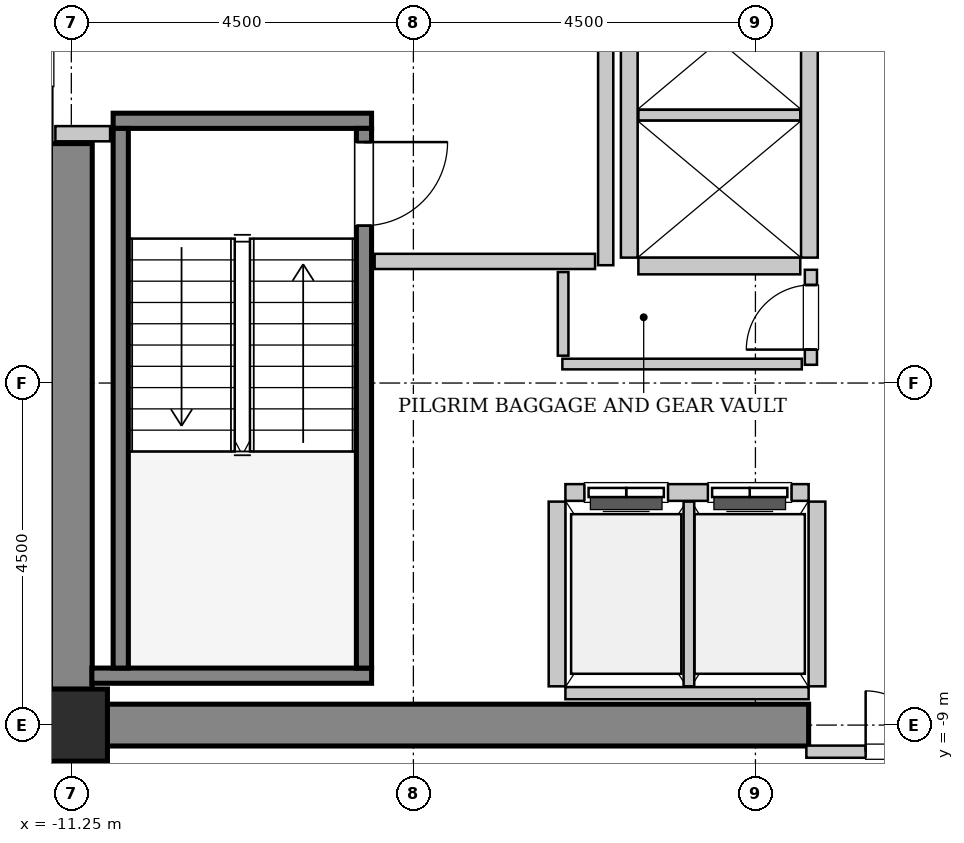
"""IFC4 building model, lengths in metres.
Left out: names, types, materials, properties, quantities, classifications, styles, units other than length and angle.
Written with IfcOpenShell. Run it as: python <this file> out.ifc"""

import sys

from ifc_helpers import new_model, si_unit, direction, frame, frame_2d, origin, origin_2d, place, context, subcontext, project, spatial, rectangle, hollow_rectangle, extrude, source, transform, mapped, element, fill, save


model = new_model("IFC4")
c1 = context("Model", 3, precision=1e-05, world=origin(), true_north=direction((0.0, 1.0)))
c2 = subcontext(c1, "Body", "Model", "MODEL_VIEW")
j1 = project(units=[si_unit("LENGTHUNIT", "METRE"), si_unit("PLANEANGLEUNIT", "RADIAN")], contexts=[c1])
p1 = place(None, origin())
s1 = spatial("IfcSite", under=j1, at=p1, CompositionType="ELEMENT")
p2 = place(p1, origin())
s2 = spatial("IfcBuilding", under=s1, at=p2, CompositionType="ELEMENT")
p3 = place(p2, frame((0.0, 0.0, 160.2)))
s3 = spatial("IfcBuildingStorey", under=s2, at=p3, CompositionType="ELEMENT", Elevation=160.2)
m1 = source(origin(), c2, "Body", "SweptSolid", [
    extrude(rectangle(XDim=9.975, YDim=0.55, at=frame_2d((4.987, 0.0))), origin(), (0.0, 0.0, 1.0), 3.8),
])
p4 = place(p3, frame((-11.525, -9.0, 0.0), z_axis=(0.0, 0.0, 1.0), x_axis=(1.0, 0.0, 0.0)))
e1 = element("IfcWall", 1, at=p4, inside=s3, PredefinedType="SHEAR", context=c2, shape_type="MappedRepresentation", body=[
    mapped(m1, transform((0.0, 0.0, 0.0), x_axis=(1.0, 0.0, 0.0), y_axis=(0.0, 1.0, 0.0), z_axis=(0.0, 0.0, 1.0), scale=1.0)),
])
m2 = source(origin(), c2, "Body", "SweptSolid", [
    extrude(rectangle(XDim=7.375, YDim=0.55, at=frame_2d((3.688, 0.0))), origin(), (0.0, 0.0, 1.0), 3.8),
])
p5 = place(p3, frame((-11.25, -8.725, 0.0), z_axis=(0.0, 0.0, 1.0), x_axis=(0.0, 1.0, 0.0)))
e2 = element("IfcWall", 2, at=p5, inside=s3, PredefinedType="SHEAR", context=c2, shape_type="MappedRepresentation", body=[
    mapped(m2, transform((0.0, 0.0, 0.0), x_axis=(1.0, 0.0, 0.0), y_axis=(0.0, 1.0, 0.0), z_axis=(0.0, 0.0, 1.0), scale=1.0)),
])
m3 = source(origin(), c2, "Body", "SweptSolid", [
    extrude(hollow_rectangle(XDim=0.95, YDim=0.95, WallThickness=0.045, InnerFilletRadius=0.045, OuterFilletRadius=0.09, at=origin_2d()), origin(), (0.0, 0.0, 1.0), 3.8),
])
p6 = place(p3, frame((-11.25, -9.0, 0.0), z_axis=(0.0, 0.0, 1.0), x_axis=(1.0, 0.0, 0.0)))
e3 = element("IfcColumn", 3, at=p6, inside=s3, PredefinedType="COLUMN", context=c2, shape_type="MappedRepresentation", body=[
    mapped(m3, transform((0.0, 0.0, 0.0), x_axis=(1.0, 0.0, 0.0), y_axis=(0.0, 1.0, 0.0), z_axis=(0.0, 0.0, 1.0), scale=1.0)),
])
m4 = source(origin(), c2, "Body", "SweptSolid", [
    extrude(rectangle(XDim=3.4, YDim=0.2, at=frame_2d((1.7, 0.0))), origin(), (0.0, 0.0, 1.0), 3.8),
])
p7 = place(p3, frame((-10.7, -1.05, 0.0), z_axis=(0.0, 0.0, 1.0), x_axis=(1.0, 0.0, 0.0)))
e4 = element("IfcWall", 4, at=p7, inside=s3, PredefinedType="SOLIDWALL", context=c2, shape_type="MappedRepresentation", body=[
    mapped(m4, transform((0.0, 0.0, 0.0), x_axis=(1.0, 0.0, 0.0), y_axis=(0.0, 1.0, 0.0), z_axis=(0.0, 0.0, 1.0), scale=1.0)),
])
m5 = source(origin(), c2, "Body", "SweptSolid", [
    extrude(rectangle(XDim=3.68, YDim=0.2, at=frame_2d((1.84, 0.0))), origin(), (0.0, 0.0, 1.0), 3.8),
])
p8 = place(p3, frame((-10.98, -8.35, 0.0), z_axis=(0.0, 0.0, 1.0), x_axis=(1.0, 0.0, 0.0)))
e5 = element("IfcWall", 5, at=p8, inside=s3, PredefinedType="SOLIDWALL", context=c2, shape_type="MappedRepresentation", body=[
    mapped(m5, transform((0.0, 0.0, 0.0), x_axis=(1.0, 0.0, 0.0), y_axis=(0.0, 1.0, 0.0), z_axis=(0.0, 0.0, 1.0), scale=1.0)),
])
m6 = source(origin(), c2, "Body", "SweptSolid", [
    extrude(rectangle(XDim=7.1, YDim=0.2, at=frame_2d((3.55, 0.0))), origin(), (0.0, 0.0, 1.0), 3.8),
])
p9 = place(p3, frame((-10.6, -1.15, 0.0), z_axis=(0.0, 0.0, 1.0), x_axis=(0.0, -1.0, 0.0)))
e6 = element("IfcWall", 6, at=p9, inside=s3, PredefinedType="SOLIDWALL", context=c2, shape_type="MappedRepresentation", body=[
    mapped(m6, transform((0.0, 0.0, 0.0), x_axis=(1.0, 0.0, 0.0), y_axis=(0.0, 1.0, 0.0), z_axis=(0.0, 0.0, 1.0), scale=1.0)),
])
p10 = place(p3, frame((-7.4, -1.15, 0.0), z_axis=(0.0, 0.0, 1.0), x_axis=(0.0, -1.0, 0.0)))
e7 = element("IfcWall", 7, at=p10, inside=s3, PredefinedType="SOLIDWALL", context=c2, shape_type="MappedRepresentation", body=[
    mapped(m6, transform((0.0, 0.0, 0.0), x_axis=(1.0, 0.0, 0.0), y_axis=(0.0, 1.0, 0.0), z_axis=(0.0, 0.0, 1.0), scale=1.0)),
])
p11 = place(p10, frame((0.18, 0.0, 0.0)))
e8 = element("IfcOpeningElement", 8, at=p11, cuts=e7, PredefinedType="OPENING", context=c2, shape_type="SweptSolid", body=[
    extrude(rectangle(XDim=1.1, YDim=2.15, at=frame_2d((0.55, 1.075))), frame((0.0, 0.11, 0.0), z_axis=(0.0, -1.0, 0.0), x_axis=(1.0, 0.0, 0.0)), (0.0, 0.0, 1.0), 0.22),
])
m7 = source(origin(), c2, "Body", "SweptSolid", [
    extrude(rectangle(XDim=3.2, YDim=0.22, at=frame_2d((1.6, 0.0))), origin(), (0.0, 0.0, 1.0), 3.535),
])
p12 = place(p3, frame((-1.55, -5.94, 0.0), z_axis=(0.0, 0.0, 1.0), x_axis=(-1.0, 0.0, 0.0)))
e9 = element("IfcWall", 9, at=p12, inside=s3, PredefinedType="SOLIDWALL", context=c2, shape_type="MappedRepresentation", body=[
    mapped(m7, transform((0.0, 0.0, 0.0), x_axis=(1.0, 0.0, 0.0), y_axis=(0.0, 1.0, 0.0), z_axis=(0.0, 0.0, 1.0), scale=1.0)),
])
p13 = place(p12, frame((1.85, 0.0, 0.0)))
e10 = element("IfcOpeningElement", 10, at=p13, cuts=e9, PredefinedType="OPENING", context=c2, shape_type="SweptSolid", body=[
    extrude(rectangle(XDim=1.1, YDim=2.2, at=frame_2d((0.55, 1.1))), frame((0.0, 0.12, 0.0), z_axis=(0.0, -1.0, 0.0), x_axis=(1.0, 0.0, 0.0)), (0.0, 0.0, 1.0), 0.24),
])
p14 = place(p12, frame((0.225, 0.0, 0.0)))
e11 = element("IfcOpeningElement", 11, at=p14, cuts=e9, PredefinedType="OPENING", context=c2, shape_type="SweptSolid", body=[
    extrude(rectangle(XDim=1.1, YDim=2.2, at=frame_2d((0.55, 1.1))), frame((0.0, 0.12, 0.0), z_axis=(0.0, -1.0, 0.0), x_axis=(1.0, 0.0, 0.0)), (0.0, 0.0, 1.0), 0.24),
])
m8 = source(origin(), c2, "Body", "SweptSolid", [
    extrude(rectangle(XDim=3.2, YDim=0.16, at=frame_2d((1.6, 0.0))), origin(), (0.0, 0.0, 1.0), 2.425),
])
p15 = place(p3, frame((-4.75, -8.58, 0.0), z_axis=(0.0, 0.0, 1.0), x_axis=(1.0, 0.0, 0.0)))
e12 = element("IfcWall", 12, at=p15, inside=s3, PredefinedType="PARTITIONING", context=c2, shape_type="MappedRepresentation", body=[
    mapped(m8, transform((0.0, 0.0, 0.0), x_axis=(1.0, 0.0, 0.0), y_axis=(0.0, 1.0, 0.0), z_axis=(0.0, 0.0, 1.0), scale=1.0)),
])
m9 = source(origin(), c2, "Body", "SweptSolid", [
    extrude(rectangle(XDim=2.43, YDim=0.22, at=frame_2d((1.215, 0.0))), origin(), (0.0, 0.0, 1.0), 3.535),
])
p16 = place(p3, frame((-4.86, -6.06, 0.0), z_axis=(0.0, 0.0, 1.0), x_axis=(0.0, -1.0, 0.0)))
e13 = element("IfcWall", 13, at=p16, inside=s3, PredefinedType="SOLIDWALL", context=c2, shape_type="MappedRepresentation", body=[
    mapped(m9, transform((0.0, 0.0, 0.0), x_axis=(1.0, 0.0, 0.0), y_axis=(0.0, 1.0, 0.0), z_axis=(0.0, 0.0, 1.0), scale=1.0)),
])
m10 = source(origin(), c2, "Body", "SweptSolid", [
    extrude(rectangle(XDim=2.43, YDim=0.14, at=frame_2d((1.215, 0.0))), origin(), (0.0, 0.0, 1.0), 3.535),
])
p17 = place(p3, frame((-3.125, -8.49, 0.0), z_axis=(0.0, 0.0, 1.0), x_axis=(0.0, 1.0, 0.0)))
e14 = element("IfcWall", 14, at=p17, inside=s3, PredefinedType="PARTITIONING", context=c2, shape_type="MappedRepresentation", body=[
    mapped(m10, transform((0.0, 0.0, 0.0), x_axis=(1.0, 0.0, 0.0), y_axis=(0.0, 1.0, 0.0), z_axis=(0.0, 0.0, 1.0), scale=1.0)),
])
p18 = place(p3, frame((-1.44, -8.49, 0.0), z_axis=(0.0, 0.0, 1.0), x_axis=(0.0, 1.0, 0.0)))
e15 = element("IfcWall", 15, at=p18, inside=s3, PredefinedType="SOLIDWALL", context=c2, shape_type="MappedRepresentation", body=[
    mapped(m9, transform((0.0, 0.0, 0.0), x_axis=(1.0, 0.0, 0.0), y_axis=(0.0, 1.0, 0.0), z_axis=(0.0, 0.0, 1.0), scale=1.0)),
])
m11 = source(origin(), c2, "Body", "SweptSolid", [
    extrude(rectangle(XDim=5.7, YDim=0.22, at=frame_2d((2.85, 0.0))), origin(), (0.0, 0.0, 1.0), 3.535),
])
for number, where, z_axis, x_axis in (
    (16, (-1.54, -2.85, 0.0), (0.0, 0.0, 1.0), (0.0, 1.0, 0.0)),
    (17, (-3.91, 2.85, 0.0), (0.0, 0.0, 1.0), (0.0, -1.0, 0.0)),
):
    element("IfcWall", number, at=place(p3, frame(where, z_axis=z_axis, x_axis=x_axis)), inside=s3, PredefinedType="SOLIDWALL", context=c2, shape_type="MappedRepresentation", body=[
        mapped(m11, transform((0.0, 0.0, 0.0), x_axis=(1.0, 0.0, 0.0), y_axis=(0.0, 1.0, 0.0), z_axis=(0.0, 0.0, 1.0), scale=1.0)),
    ])
m12 = source(origin(), c2, "Body", "SweptSolid", [
    extrude(rectangle(XDim=2.13, YDim=0.22, at=frame_2d((1.065, 0.0))), origin(), (0.0, 0.0, 1.0), 3.535),
])
p19 = place(p3, frame((-3.79, -2.96, 0.0), z_axis=(0.0, 0.0, 1.0), x_axis=(1.0, 0.0, 0.0)))
e18 = element("IfcWall", 18, at=p19, inside=s3, PredefinedType="SOLIDWALL", context=c2, shape_type="MappedRepresentation", body=[
    mapped(m12, transform((0.0, 0.0, 0.0), x_axis=(1.0, 0.0, 0.0), y_axis=(0.0, 1.0, 0.0), z_axis=(0.0, 0.0, 1.0), scale=1.0)),
])
m13 = source(origin(), c2, "Body", "SweptSolid", [
    extrude(rectangle(XDim=2.13, YDim=0.14, at=frame_2d((1.065, 0.0))), origin(), (0.0, 0.0, 1.0), 3.535),
])
p20 = place(p3, frame((-3.79, -0.975, 0.0), z_axis=(0.0, 0.0, 1.0), x_axis=(1.0, 0.0, 0.0)))
e19 = element("IfcWall", 19, at=p20, inside=s3, PredefinedType="PARTITIONING", context=c2, shape_type="MappedRepresentation", body=[
    mapped(m13, transform((0.0, 0.0, 0.0), x_axis=(1.0, 0.0, 0.0), y_axis=(0.0, 1.0, 0.0), z_axis=(0.0, 0.0, 1.0), scale=1.0)),
])
m14 = source(origin(), c2, "Body", "SweptSolid", [
    extrude(rectangle(XDim=5.9, YDim=0.2, at=frame_2d((2.95, 0.0))), origin(), (0.0, 0.0, 1.0), 3.535),
])
p21 = place(p3, frame((-4.22, -2.95, 0.0), z_axis=(0.0, 0.0, 1.0), x_axis=(0.0, 1.0, 0.0)))
e20 = element("IfcWall", 20, at=p21, inside=s3, PredefinedType="PARTITIONING", context=c2, shape_type="MappedRepresentation", body=[
    mapped(m14, transform((0.0, 0.0, 0.0), x_axis=(1.0, 0.0, 0.0), y_axis=(0.0, 1.0, 0.0), z_axis=(0.0, 0.0, 1.0), scale=1.0)),
])
m15 = source(origin(), c2, "Body", "SweptSolid", [
    extrude(rectangle(XDim=2.9, YDim=0.2, at=frame_2d((1.45, 0.0))), origin(), (0.0, 0.0, 1.0), 3.535),
])
p22 = place(p3, frame((-7.26, -2.9, 0.0), z_axis=(0.0, 0.0, 1.0), x_axis=(1.0, 0.0, 0.0)))
e21 = element("IfcWall", 21, at=p22, inside=s3, PredefinedType="PARTITIONING", context=c2, shape_type="MappedRepresentation", body=[
    mapped(m15, transform((0.0, 0.0, 0.0), x_axis=(1.0, 0.0, 0.0), y_axis=(0.0, 1.0, 0.0), z_axis=(0.0, 0.0, 1.0), scale=1.0)),
])
m16 = source(origin(), c2, "Body", "SweptSolid", [
    extrude(rectangle(XDim=0.72, YDim=0.2, at=frame_2d((0.36, 0.0))), origin(), (0.0, 0.0, 1.0), 3.535),
])
p23 = place(p3, frame((-11.46, -1.22, 0.0), z_axis=(0.0, 0.0, 1.0), x_axis=(1.0, 0.0, 0.0)))
e22 = element("IfcWall", 22, at=p23, inside=s3, PredefinedType="PARTITIONING", context=c2, shape_type="MappedRepresentation", body=[
    mapped(m16, transform((0.0, 0.0, 0.0), x_axis=(1.0, 0.0, 0.0), y_axis=(0.0, 1.0, 0.0), z_axis=(0.0, 0.0, 1.0), scale=1.0)),
])
m17 = source(origin(), c2, "Body", "SweptSolid", [
    extrude(rectangle(XDim=3.16, YDim=0.16, at=frame_2d((1.58, 0.0))), origin(), (0.0, 0.0, 1.0), 2.425),
])
p24 = place(p3, frame((-1.58, -9.35, 0.0), z_axis=(0.0, 0.0, 1.0), x_axis=(1.0, 0.0, 0.0)))
e23 = element("IfcWall", 23, at=p24, inside=s3, PredefinedType="PARTITIONING", context=c2, shape_type="MappedRepresentation", body=[
    mapped(m17, transform((0.0, 0.0, 0.0), x_axis=(1.0, 0.0, 0.0), y_axis=(0.0, 1.0, 0.0), z_axis=(0.0, 0.0, 1.0), scale=1.0)),
])
p25 = place(p24, frame((0.78, 0.0, 0.0)))
e24 = element("IfcOpeningElement", 24, at=p25, cuts=e23, PredefinedType="OPENING", context=c2, shape_type="SweptSolid", body=[
    extrude(rectangle(XDim=1.6, YDim=2.3, at=frame_2d((0.8, 1.15))), frame((0.0, 0.09, 0.0), z_axis=(0.0, -1.0, 0.0), x_axis=(1.0, 0.0, 0.0)), (0.0, 0.0, 1.0), 0.18),
])
m18 = source(origin(), c2, "Body", "SweptSolid", [
    extrude(rectangle(XDim=1.25, YDim=0.16, at=frame_2d((0.625, 0.0))), origin(), (0.0, 0.0, 1.0), 3.535),
])
p26 = place(p3, frame((-1.52, -4.26, 0.0), z_axis=(0.0, 0.0, 1.0), x_axis=(0.0, 1.0, 0.0)))
e25 = element("IfcWall", 25, at=p26, inside=s3, PredefinedType="PARTITIONING", context=c2, shape_type="MappedRepresentation", body=[
    mapped(m18, transform((0.0, 0.0, 0.0), x_axis=(1.0, 0.0, 0.0), y_axis=(0.0, 1.0, 0.0), z_axis=(0.0, 0.0, 1.0), scale=1.0)),
])
p27 = place(p26, frame((0.2, 0.0, 0.0)))
e26 = element("IfcOpeningElement", 26, at=p27, cuts=e25, PredefinedType="OPENING", context=c2, shape_type="SweptSolid", body=[
    extrude(rectangle(XDim=0.85, YDim=2.1, at=frame_2d((0.425, 1.05))), frame((0.0, 0.09, 0.0), z_axis=(0.0, -1.0, 0.0), x_axis=(1.0, 0.0, 0.0)), (0.0, 0.0, 1.0), 0.18),
])
m19 = source(origin(), c2, "Body", "SweptSolid", [
    extrude(rectangle(XDim=3.15, YDim=0.14, at=frame_2d((1.575, 0.0))), origin(), (0.0, 0.0, 1.0), 3.535),
])
p28 = place(p3, frame((-4.79, -4.25, 0.0), z_axis=(0.0, 0.0, 1.0), x_axis=(1.0, 0.0, 0.0)))
e27 = element("IfcWall", 27, at=p28, inside=s3, PredefinedType="PARTITIONING", context=c2, shape_type="MappedRepresentation", body=[
    mapped(m19, transform((0.0, 0.0, 0.0), x_axis=(1.0, 0.0, 0.0), y_axis=(0.0, 1.0, 0.0), z_axis=(0.0, 0.0, 1.0), scale=1.0)),
])
m20 = source(origin(), c2, "Body", "SweptSolid", [
    extrude(rectangle(XDim=1.1, YDim=0.14, at=frame_2d((0.55, 0.0))), origin(), (0.0, 0.0, 1.0), 3.535),
])
p29 = place(p3, frame((-4.78, -4.14, 0.0), z_axis=(0.0, 0.0, 1.0), x_axis=(0.0, 1.0, 0.0)))
e28 = element("IfcWall", 28, at=p29, inside=s3, PredefinedType="PARTITIONING", context=c2, shape_type="MappedRepresentation", body=[
    mapped(m20, transform((0.0, 0.0, 0.0), x_axis=(1.0, 0.0, 0.0), y_axis=(0.0, 1.0, 0.0), z_axis=(0.0, 0.0, 1.0), scale=1.0)),
])
m21 = source(origin(), c2, "Body", "SweptSolid", [
    extrude(rectangle(XDim=1.1, YDim=2.15, at=frame_2d((0.55, 1.075))), frame((0.0, 0.025, 0.0), z_axis=(0.0, -1.0, 0.0), x_axis=(1.0, 0.0, 0.0)), (0.0, 0.0, 1.0), 0.05),
])
p30 = place(p11, origin())
e29 = element("IfcDoor", 29, at=p30, inside=s3, OperationType="SINGLE_SWING_LEFT", PredefinedType="DOOR", context=c2, shape_type="MappedRepresentation", body=[
    mapped(m21, transform((0.0, 0.0, 0.0), x_axis=(1.0, 0.0, 0.0), y_axis=(0.0, 1.0, 0.0), z_axis=(0.0, 0.0, 1.0), scale=1.0)),
])
fill(e8, e29)
m22 = source(origin(), c2, "Body", "SweptSolid", [
    extrude(rectangle(XDim=1.1, YDim=2.2, at=frame_2d((0.55, 1.1))), frame((0.0, 0.025, 0.0), z_axis=(0.0, -1.0, 0.0), x_axis=(1.0, 0.0, 0.0)), (0.0, 0.0, 1.0), 0.05),
])
p31 = place(p13, origin())
e30 = element("IfcDoor", 30, at=p31, inside=s3, OperationType="DOUBLE_DOOR_SLIDING", PredefinedType="DOOR", context=c2, shape_type="MappedRepresentation", body=[
    mapped(m22, transform((0.0, 0.0, 0.0), x_axis=(1.0, 0.0, 0.0), y_axis=(0.0, 1.0, 0.0), z_axis=(0.0, 0.0, 1.0), scale=1.0)),
])
fill(e10, e30)
p32 = place(p14, origin())
e31 = element("IfcDoor", 31, at=p32, inside=s3, OperationType="DOUBLE_DOOR_SLIDING", PredefinedType="DOOR", context=c2, shape_type="MappedRepresentation", body=[
    mapped(m22, transform((0.0, 0.0, 0.0), x_axis=(1.0, 0.0, 0.0), y_axis=(0.0, 1.0, 0.0), z_axis=(0.0, 0.0, 1.0), scale=1.0)),
])
fill(e11, e31)
m23 = source(origin(), c2, "Body", "SweptSolid", [
    extrude(rectangle(XDim=1.6, YDim=2.3, at=frame_2d((0.8, 1.15))), frame((0.0, 0.025, 0.0), z_axis=(0.0, -1.0, 0.0), x_axis=(1.0, 0.0, 0.0)), (0.0, 0.0, 1.0), 0.05),
])
p33 = place(p25, origin())
e32 = element("IfcDoor", 32, at=p33, inside=s3, OperationType="DOUBLE_DOOR_SINGLE_SWING", PredefinedType="DOOR", context=c2, shape_type="MappedRepresentation", body=[
    mapped(m23, transform((0.0, 0.0, 0.0), x_axis=(1.0, 0.0, 0.0), y_axis=(0.0, 1.0, 0.0), z_axis=(0.0, 0.0, 1.0), scale=1.0)),
])
fill(e24, e32)
m24 = source(origin(), c2, "Body", "SweptSolid", [
    extrude(rectangle(XDim=0.85, YDim=2.1, at=frame_2d((0.425, 1.05))), frame((0.0, 0.025, 0.0), z_axis=(0.0, -1.0, 0.0), x_axis=(1.0, 0.0, 0.0)), (0.0, 0.0, 1.0), 0.05),
])
p34 = place(p27, origin())
e33 = element("IfcDoor", 33, at=p34, inside=s3, OperationType="SINGLE_SWING_LEFT", PredefinedType="DOOR", context=c2, shape_type="MappedRepresentation", body=[
    mapped(m24, transform((0.0, 0.0, 0.0), x_axis=(1.0, 0.0, 0.0), y_axis=(0.0, 1.0, 0.0), z_axis=(0.0, 0.0, 1.0), scale=1.0)),
])
fill(e26, e33)
save(model, sys.argv[1])
